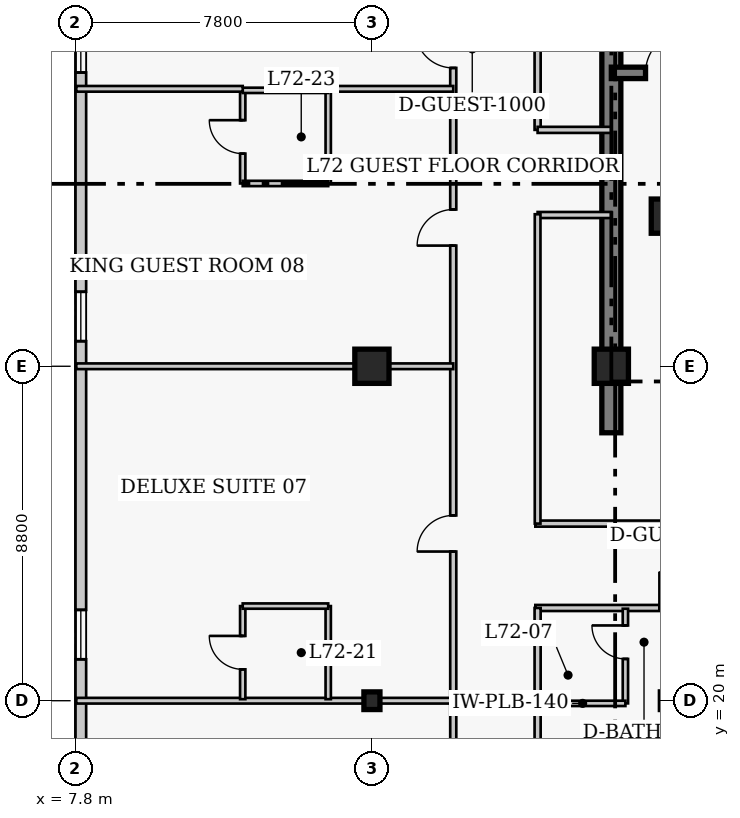
"""IFC4 building model, lengths in metres.
Left out: names, types, materials, properties, quantities, classifications, styles, units other than length and angle.
Written with IfcOpenShell. Run it as: python <this file> out.ifc"""

import sys

from ifc_helpers import new_model, si_unit, direction, frame, frame_2d, origin, origin_2d, place, context, subcontext, project, spatial, rectangle, i_section, extrude, element, fill, save


model = new_model("IFC4")
c1 = context("Model", 3, precision=1e-05, world=origin(), true_north=direction((0.0, 1.0)))
c2 = subcontext(c1, "Body", "Model", "MODEL_VIEW")
j1 = project(units=[si_unit("LENGTHUNIT", "METRE"), si_unit("PLANEANGLEUNIT", "RADIAN")], contexts=[c1])
p1 = place(None, origin())
s1 = spatial("IfcSite", under=j1, at=p1, CompositionType="ELEMENT")
p2 = place(p1, origin())
s2 = spatial("IfcBuilding", under=s1, at=p2, CompositionType="ELEMENT")
p3 = place(p2, frame((0.0, 0.0, 289.4)))
s3 = spatial("IfcBuildingStorey", under=s2, at=p3, CompositionType="ELEMENT", Elevation=289.4)
p4 = place(p3, frame((21.9, 27.05, 0.0), z_axis=(0.0, 0.0, 1.0), x_axis=(0.0, 1.0, 0.0)))
e1 = element("IfcWall", 1, at=p4, inside=s3, PredefinedType="SHEAR", context=c2, shape_type="SweptSolid", body=[
    extrude(rectangle(XDim=13.52, YDim=0.5, at=frame_2d((6.76, 0.0))), origin(), (0.0, 0.0, 1.0), 4.0),
])
p5 = place(p3, frame((21.9, 36.52, 0.0), z_axis=(0.0, 0.0, 1.0), x_axis=(1.0, 0.0, 0.0)))
e2 = element("IfcWall", 2, at=p5, inside=s3, PredefinedType="SHEAR", context=c2, shape_type="SweptSolid", body=[
    extrude(rectangle(XDim=8.32, YDim=0.3, at=frame_2d((4.16, 0.0))), origin(), (0.0, 0.0, 1.0), 4.0),
])
p6 = place(p5, frame((0.9, 0.0, 0.0)))
e3 = element("IfcOpeningElement", 3, at=p6, cuts=e2, PredefinedType="OPENING", context=c2, shape_type="SweptSolid", body=[
    extrude(rectangle(XDim=1.1, YDim=2.15, at=frame_2d((0.55, 1.075))), frame((0.0, 0.16, 0.0), z_axis=(0.0, -1.0, 0.0), x_axis=(1.0, 0.0, 0.0)), (0.0, 0.0, 1.0), 0.32),
])
p7 = place(p3, frame((15.6, 20.0, 0.0), z_axis=(0.0, 0.0, 1.0), x_axis=(1.0, 0.0, 0.0)))
e4 = element("IfcColumn", 4, at=p7, inside=s3, PredefinedType="COLUMN", context=c2, shape_type="SweptSolid", body=[
    extrude(i_section(OverallWidth=0.422, OverallDepth=0.465, WebThickness=0.045, FlangeThickness=0.073, FilletRadius=0.017, at=origin_2d()), origin(), (0.0, 0.0, 1.0), 4.0),
])
p8 = place(p3, frame((15.6, 28.8, 0.0), z_axis=(0.0, 0.0, 1.0), x_axis=(1.0, 0.0, 0.0)))
e5 = element("IfcColumn", 5, at=p8, inside=s3, PredefinedType="COLUMN", context=c2, shape_type="SweptSolid", body=[
    extrude(rectangle(XDim=0.9, YDim=0.9, at=origin_2d()), origin(), (0.0, 0.0, 1.0), 4.0),
])
p9 = place(p3, frame((23.4, 20.0, 0.0), z_axis=(0.0, 0.0, 1.0), x_axis=(1.0, 0.0, 0.0)))
e6 = element("IfcColumn", 6, at=p9, inside=s3, PredefinedType="COLUMN", context=c2, shape_type="SweptSolid", body=[
    extrude(i_section(OverallWidth=0.422, OverallDepth=0.465, WebThickness=0.045, FlangeThickness=0.073, FilletRadius=0.017, at=origin_2d()), origin(), (0.0, 0.0, 1.0), 4.0),
])
for number, where, z_axis, x_axis in (
    (7, (21.9, 28.8, 0.0), (0.0, 0.0, 1.0), (1.0, 0.0, 0.0)),
    (8, (23.4, 32.75, 0.0), (0.0, 0.0, 1.0), (1.0, 0.0, 0.0)),
):
    element("IfcColumn", number, at=place(p3, frame(where, z_axis=z_axis, x_axis=x_axis)), inside=s3, PredefinedType="COLUMN", context=c2, shape_type="SweptSolid", body=[
        extrude(rectangle(XDim=0.9, YDim=0.9, at=origin_2d()), origin(), (0.0, 0.0, 1.0), 4.0),
    ])
p10 = place(p3, frame((7.94, 41.04, 0.0), z_axis=(0.0, 0.0, 1.0), x_axis=(0.0, -1.0, 0.0)))
e9 = element("IfcWall", 9, at=p10, inside=s3, PredefinedType="SOLIDWALL", context=c2, shape_type="SweptSolid", body=[
    extrude(rectangle(XDim=30.88, YDim=0.28, at=frame_2d((15.44, 0.0))), origin(), (0.0, 0.0, 1.0), 3.76),
])
p11 = place(p10, frame((3.21, 0.0, 0.85)))
e10 = element("IfcOpeningElement", 10, at=p11, cuts=e9, PredefinedType="OPENING", context=c2, shape_type="SweptSolid", body=[
    extrude(rectangle(XDim=1.3, YDim=1.7, at=frame_2d((0.65, 0.85))), frame((0.0, 0.15, 0.0), z_axis=(0.0, -1.0, 0.0), x_axis=(1.0, 0.0, 0.0)), (0.0, 0.0, 1.0), 0.3),
])
p12 = place(p10, frame((10.28, 0.0, 0.85)))
e11 = element("IfcOpeningElement", 11, at=p12, cuts=e9, PredefinedType="OPENING", context=c2, shape_type="SweptSolid", body=[
    extrude(rectangle(XDim=1.3, YDim=1.7, at=frame_2d((0.65, 0.85))), frame((0.0, 0.15, 0.0), z_axis=(0.0, -1.0, 0.0), x_axis=(1.0, 0.0, 0.0)), (0.0, 0.0, 1.0), 0.3),
])
p13 = place(p10, frame((18.65, 0.0, 0.85)))
e12 = element("IfcOpeningElement", 12, at=p13, cuts=e9, PredefinedType="OPENING", context=c2, shape_type="SweptSolid", body=[
    extrude(rectangle(XDim=1.3, YDim=1.7, at=frame_2d((0.65, 0.85))), frame((0.0, 0.15, 0.0), z_axis=(0.0, -1.0, 0.0), x_axis=(1.0, 0.0, 0.0)), (0.0, 0.0, 1.0), 0.3),
])
p14 = place(p10, frame((26.37, 0.0, 0.85)))
e13 = element("IfcOpeningElement", 13, at=p14, cuts=e9, PredefinedType="OPENING", context=c2, shape_type="SweptSolid", body=[
    extrude(rectangle(XDim=1.3, YDim=1.7, at=frame_2d((0.65, 0.85))), frame((0.0, 0.15, 0.0), z_axis=(0.0, -1.0, 0.0), x_axis=(1.0, 0.0, 0.0)), (0.0, 0.0, 1.0), 0.3),
])
p15 = place(p3, frame((19.9, 24.66, 0.0), z_axis=(0.0, 0.0, 1.0), x_axis=(1.0, 0.0, 0.0)))
e14 = element("IfcWall", 14, at=p15, inside=s3, PredefinedType="PARTITIONING", context=c2, shape_type="SweptSolid", body=[
    extrude(rectangle(XDim=13.75, YDim=0.16, at=frame_2d((6.875, 0.0))), origin(), (0.0, 0.0, 1.0), 3.76),
])
p16 = place(p15, frame((6.25, 0.0, 0.0)))
e15 = element("IfcOpeningElement", 15, at=p16, cuts=e14, PredefinedType="OPENING", context=c2, shape_type="SweptSolid", body=[
    extrude(rectangle(XDim=1.0, YDim=2.15, at=frame_2d((0.5, 1.075))), frame((0.0, 0.09, 0.0), z_axis=(0.0, -1.0, 0.0), x_axis=(1.0, 0.0, 0.0)), (0.0, 0.0, 1.0), 0.18),
])
p17 = place(p3, frame((19.9, 22.44, 0.0), z_axis=(0.0, 0.0, 1.0), x_axis=(1.0, 0.0, 0.0)))
e16 = element("IfcWall", 16, at=p17, inside=s3, PredefinedType="PARTITIONING", context=c2, shape_type="SweptSolid", body=[
    extrude(rectangle(XDim=15.9, YDim=0.16, at=frame_2d((7.95, 0.0))), origin(), (0.0, 0.0, 1.0), 3.76),
])
p18 = place(p17, frame((3.265, 0.0, 0.0)))
e17 = element("IfcOpeningElement", 17, at=p18, cuts=e16, PredefinedType="OPENING", context=c2, shape_type="SweptSolid", body=[
    extrude(rectangle(XDim=0.95, YDim=2.1, at=frame_2d((0.475, 1.05))), frame((0.0, 0.09, 0.0), z_axis=(0.0, -1.0, 0.0), x_axis=(1.0, 0.0, 0.0)), (0.0, 0.0, 1.0), 0.18),
])
p19 = place(p17, frame((7.135, 0.0, 0.0)))
e18 = element("IfcOpeningElement", 18, at=p19, cuts=e16, PredefinedType="OPENING", context=c2, shape_type="SweptSolid", body=[
    extrude(rectangle(XDim=1.0, YDim=2.15, at=frame_2d((0.5, 1.075))), frame((0.0, 0.09, 0.0), z_axis=(0.0, -1.0, 0.0), x_axis=(1.0, 0.0, 0.0)), (0.0, 0.0, 1.0), 0.18),
])
p20 = place(p17, frame((11.4, 0.0, 0.0)))
e19 = element("IfcOpeningElement", 19, at=p20, cuts=e16, PredefinedType="OPENING", context=c2, shape_type="SweptSolid", body=[
    extrude(rectangle(XDim=0.95, YDim=2.1, at=frame_2d((0.475, 1.05))), frame((0.0, 0.09, 0.0), z_axis=(0.0, -1.0, 0.0), x_axis=(1.0, 0.0, 0.0)), (0.0, 0.0, 1.0), 0.18),
])
p21 = place(p3, frame((17.74, 8.55, 0.0), z_axis=(0.0, 0.0, 1.0), x_axis=(0.0, 1.0, 0.0)))
e20 = element("IfcWall", 20, at=p21, inside=s3, PredefinedType="PARTITIONING", context=c2, shape_type="SweptSolid", body=[
    extrude(rectangle(XDim=32.1, YDim=0.16, at=frame_2d((16.05, 0.0))), origin(), (0.0, 0.0, 1.0), 3.76),
])
p22 = place(p21, frame((5.25, 0.0, 0.0)))
e21 = element("IfcOpeningElement", 21, at=p22, cuts=e20, PredefinedType="OPENING", context=c2, shape_type="SweptSolid", body=[
    extrude(rectangle(XDim=0.95, YDim=2.1, at=frame_2d((0.475, 1.05))), frame((0.0, 0.09, 0.0), z_axis=(0.0, -1.0, 0.0), x_axis=(1.0, 0.0, 0.0)), (0.0, 0.0, 1.0), 0.18),
])
p23 = place(p21, frame((15.375, 0.0, 0.0)))
e22 = element("IfcOpeningElement", 22, at=p23, cuts=e20, PredefinedType="OPENING", context=c2, shape_type="SweptSolid", body=[
    extrude(rectangle(XDim=0.95, YDim=2.1, at=frame_2d((0.475, 1.05))), frame((0.0, 0.09, 0.0), z_axis=(0.0, -1.0, 0.0), x_axis=(1.0, 0.0, 0.0)), (0.0, 0.0, 1.0), 0.18),
])
p24 = place(p21, frame((23.425, 0.0, 0.0)))
e23 = element("IfcOpeningElement", 23, at=p24, cuts=e20, PredefinedType="OPENING", context=c2, shape_type="SweptSolid", body=[
    extrude(rectangle(XDim=0.95, YDim=2.1, at=frame_2d((0.475, 1.05))), frame((0.0, 0.09, 0.0), z_axis=(0.0, -1.0, 0.0), x_axis=(1.0, 0.0, 0.0)), (0.0, 0.0, 1.0), 0.18),
])
p25 = place(p21, frame((28.1, 0.0, 0.0)))
e24 = element("IfcOpeningElement", 24, at=p25, cuts=e20, PredefinedType="OPENING", context=c2, shape_type="SweptSolid", body=[
    extrude(rectangle(XDim=1.0, YDim=2.15, at=frame_2d((0.5, 1.075))), frame((0.0, 0.09, 0.0), z_axis=(0.0, -1.0, 0.0), x_axis=(1.0, 0.0, 0.0)), (0.0, 0.0, 1.0), 0.18),
])
p26 = place(p3, frame((19.96, 8.55, 0.0), z_axis=(0.0, 0.0, 1.0), x_axis=(0.0, 1.0, 0.0)))
e25 = element("IfcWall", 25, at=p26, inside=s3, PredefinedType="PARTITIONING", context=c2, shape_type="SweptSolid", body=[
    extrude(rectangle(XDim=13.89, YDim=0.16, at=frame_2d((6.945, 0.0))), origin(), (0.0, 0.0, 1.0), 3.76),
])
p27 = place(p3, frame((19.96, 35.02, 0.0), z_axis=(0.0, 0.0, 1.0), x_axis=(0.0, 1.0, 0.0)))
e26 = element("IfcWall", 26, at=p27, inside=s3, PredefinedType="PARTITIONING", context=c2, shape_type="SweptSolid", body=[
    extrude(rectangle(XDim=5.63, YDim=0.16, at=frame_2d((2.815, 0.0))), origin(), (0.0, 0.0, 1.0), 3.76),
])
for number, where, z_axis, x_axis in (
    (27, (19.96, 35.02, 0.0), (0.0, 0.0, 1.0), (1.0, 0.0, 0.0)),
    (28, (19.96, 32.78, 0.0), (0.0, 0.0, 1.0), (1.0, 0.0, 0.0)),
):
    element("IfcWall", number, at=place(p3, frame(where, z_axis=z_axis, x_axis=x_axis)), inside=s3, PredefinedType="PARTITIONING", context=c2, shape_type="SweptSolid", body=[
        extrude(rectangle(XDim=1.94, YDim=0.16, at=frame_2d((0.97, 0.0))), origin(), (0.0, 0.0, 1.0), 3.76),
    ])
p28 = place(p3, frame((19.96, 24.66, 0.0), z_axis=(0.0, 0.0, 1.0), x_axis=(0.0, 1.0, 0.0)))
e29 = element("IfcWall", 29, at=p28, inside=s3, PredefinedType="PARTITIONING", context=c2, shape_type="SweptSolid", body=[
    extrude(rectangle(XDim=8.14, YDim=0.15, at=frame_2d((4.07, 0.0))), origin(), (0.0, 0.0, 1.0), 3.76),
])
p29 = place(p3, frame((22.27, 19.93, 0.0), z_axis=(0.0, 0.0, 1.0), x_axis=(0.0, 1.0, 0.0)))
e30 = element("IfcWall", 30, at=p29, inside=s3, PredefinedType="PLUMBINGWALL", context=c2, shape_type="SweptSolid", body=[
    extrude(rectangle(XDim=2.49, YDim=0.14, at=frame_2d((1.245, 0.0))), origin(), (0.0, 0.0, 1.0), 3.76),
])
p30 = place(p29, frame((1.17, 0.0, 0.0)))
e31 = element("IfcOpeningElement", 31, at=p30, cuts=e30, PredefinedType="OPENING", context=c2, shape_type="SweptSolid", body=[
    extrude(rectangle(XDim=0.88, YDim=2.05, at=frame_2d((0.44, 1.025))), frame((0.0, 0.08, 0.0), z_axis=(0.0, -1.0, 0.0), x_axis=(1.0, 0.0, 0.0)), (0.0, 0.0, 1.0), 0.16),
])
p31 = place(p3, frame((20.02, 19.93, 0.0), z_axis=(0.0, 0.0, 1.0), x_axis=(1.0, 0.0, 0.0)))
e32 = element("IfcWall", 32, at=p31, inside=s3, PredefinedType="PLUMBINGWALL", context=c2, shape_type="SweptSolid", body=[
    extrude(rectangle(XDim=2.25, YDim=0.14, at=frame_2d((1.125, 0.0))), origin(), (0.0, 0.0, 1.0), 3.064),
])
p32 = place(p3, frame((7.82, 20.0, 0.0), z_axis=(0.0, 0.0, 1.0), x_axis=(1.0, 0.0, 0.0)))
e33 = element("IfcWall", 33, at=p32, inside=s3, PredefinedType="PARTITIONING", context=c2, shape_type="SweptSolid", body=[
    extrude(rectangle(XDim=9.92, YDim=0.15, at=frame_2d((4.96, 0.0))), origin(), (0.0, 0.0, 1.0), 3.064),
])
p33 = place(p3, frame((12.2, 20.04, 0.0), z_axis=(0.0, 0.0, 1.0), x_axis=(0.0, 1.0, 0.0)))
e34 = element("IfcWall", 34, at=p33, inside=s3, PredefinedType="PLUMBINGWALL", context=c2, shape_type="SweptSolid", body=[
    extrude(rectangle(XDim=2.45, YDim=0.14, at=frame_2d((1.225, 0.0))), origin(), (0.0, 0.0, 1.0), 3.76),
])
p34 = place(p33, frame((0.785, 0.0, 0.0)))
e35 = element("IfcOpeningElement", 35, at=p34, cuts=e34, PredefinedType="OPENING", context=c2, shape_type="SweptSolid", body=[
    extrude(rectangle(XDim=0.88, YDim=2.05, at=frame_2d((0.44, 1.025))), frame((0.0, 0.08, 0.0), z_axis=(0.0, -1.0, 0.0), x_axis=(1.0, 0.0, 0.0)), (0.0, 0.0, 1.0), 0.16),
])
p35 = place(p3, frame((14.45, 20.04, 0.0), z_axis=(0.0, 0.0, 1.0), x_axis=(0.0, 1.0, 0.0)))
e36 = element("IfcWall", 36, at=p35, inside=s3, PredefinedType="PLUMBINGWALL", context=c2, shape_type="SweptSolid", body=[
    extrude(rectangle(XDim=2.45, YDim=0.14, at=frame_2d((1.225, 0.0))), origin(), (0.0, 0.0, 1.0), 3.76),
])
p36 = place(p3, frame((12.2, 22.49, 0.0), z_axis=(0.0, 0.0, 1.0), x_axis=(1.0, 0.0, 0.0)))
e37 = element("IfcWall", 37, at=p36, inside=s3, PredefinedType="PLUMBINGWALL", context=c2, shape_type="SweptSolid", body=[
    extrude(rectangle(XDim=2.25, YDim=0.14, at=frame_2d((1.125, 0.0))), origin(), (0.0, 0.0, 1.0), 3.76),
])
p37 = place(p3, frame((7.82, 28.8, 0.0), z_axis=(0.0, 0.0, 1.0), x_axis=(1.0, 0.0, 0.0)))
e38 = element("IfcWall", 38, at=p37, inside=s3, PredefinedType="PARTITIONING", context=c2, shape_type="SweptSolid", body=[
    extrude(rectangle(XDim=9.92, YDim=0.15, at=frame_2d((4.96, 0.0))), origin(), (0.0, 0.0, 1.0), 3.064),
])
p38 = place(p3, frame((12.2, 33.61, 0.0), z_axis=(0.0, 0.0, 1.0), x_axis=(0.0, 1.0, 0.0)))
e39 = element("IfcWall", 39, at=p38, inside=s3, PredefinedType="PLUMBINGWALL", context=c2, shape_type="SweptSolid", body=[
    extrude(rectangle(XDim=2.45, YDim=0.14, at=frame_2d((1.225, 0.0))), origin(), (0.0, 0.0, 1.0), 3.76),
])
p39 = place(p38, frame((0.785, 0.0, 0.0)))
e40 = element("IfcOpeningElement", 40, at=p39, cuts=e39, PredefinedType="OPENING", context=c2, shape_type="SweptSolid", body=[
    extrude(rectangle(XDim=0.88, YDim=2.05, at=frame_2d((0.44, 1.025))), frame((0.0, 0.08, 0.0), z_axis=(0.0, -1.0, 0.0), x_axis=(1.0, 0.0, 0.0)), (0.0, 0.0, 1.0), 0.16),
])
p40 = place(p3, frame((14.45, 33.61, 0.0), z_axis=(0.0, 0.0, 1.0), x_axis=(0.0, 1.0, 0.0)))
e41 = element("IfcWall", 41, at=p40, inside=s3, PredefinedType="PLUMBINGWALL", context=c2, shape_type="SweptSolid", body=[
    extrude(rectangle(XDim=2.45, YDim=0.14, at=frame_2d((1.225, 0.0))), origin(), (0.0, 0.0, 1.0), 3.76),
])
for number, where, z_axis, x_axis in (
    (42, (12.2, 33.61, 0.0), (0.0, 0.0, 1.0), (1.0, 0.0, 0.0)),
    (43, (12.2, 36.06, 0.0), (0.0, 0.0, 1.0), (1.0, 0.0, 0.0)),
):
    element("IfcWall", number, at=place(p3, frame(where, z_axis=z_axis, x_axis=x_axis)), inside=s3, PredefinedType="PLUMBINGWALL", context=c2, shape_type="SweptSolid", body=[
        extrude(rectangle(XDim=2.25, YDim=0.14, at=frame_2d((1.125, 0.0))), origin(), (0.0, 0.0, 1.0), 3.76),
    ])
p41 = place(p3, frame((7.82, 36.1, 0.0), z_axis=(0.0, 0.0, 1.0), x_axis=(1.0, 0.0, 0.0)))
e44 = element("IfcWall", 44, at=p41, inside=s3, PredefinedType="PARTITIONING", context=c2, shape_type="SweptSolid", body=[
    extrude(rectangle(XDim=4.38, YDim=0.15, at=frame_2d((2.19, 0.0))), origin(), (0.0, 0.0, 1.0), 3.76),
])
p42 = place(p3, frame((14.45, 36.1, 0.0), z_axis=(0.0, 0.0, 1.0), x_axis=(1.0, 0.0, 0.0)))
e45 = element("IfcWall", 45, at=p42, inside=s3, PredefinedType="PARTITIONING", context=c2, shape_type="SweptSolid", body=[
    extrude(rectangle(XDim=3.29, YDim=0.15, at=frame_2d((1.645, 0.0))), origin(), (0.0, 0.0, 1.0), 3.76),
])
p43 = place(p11, origin())
e46 = element("IfcWindow", 46, at=p43, inside=s3, PartitioningType="SINGLE_PANEL", PredefinedType="WINDOW", context=c2, shape_type="SweptSolid", body=[
    extrude(rectangle(XDim=1.3, YDim=1.7, at=frame_2d((0.65, 0.85))), frame((0.0, 0.03, 0.0), z_axis=(0.0, -1.0, 0.0), x_axis=(1.0, 0.0, 0.0)), (0.0, 0.0, 1.0), 0.06),
])
fill(e10, e46)
p44 = place(p12, origin())
e47 = element("IfcWindow", 47, at=p44, inside=s3, PartitioningType="SINGLE_PANEL", PredefinedType="WINDOW", context=c2, shape_type="SweptSolid", body=[
    extrude(rectangle(XDim=1.3, YDim=1.7, at=frame_2d((0.65, 0.85))), frame((0.0, 0.03, 0.0), z_axis=(0.0, -1.0, 0.0), x_axis=(1.0, 0.0, 0.0)), (0.0, 0.0, 1.0), 0.06),
])
fill(e11, e47)
p45 = place(p13, origin())
e48 = element("IfcWindow", 48, at=p45, inside=s3, PartitioningType="SINGLE_PANEL", PredefinedType="WINDOW", context=c2, shape_type="SweptSolid", body=[
    extrude(rectangle(XDim=1.3, YDim=1.7, at=frame_2d((0.65, 0.85))), frame((0.0, 0.03, 0.0), z_axis=(0.0, -1.0, 0.0), x_axis=(1.0, 0.0, 0.0)), (0.0, 0.0, 1.0), 0.06),
])
fill(e12, e48)
p46 = place(p30, origin())
e49 = element("IfcDoor", 49, at=p46, inside=s3, OperationType="SINGLE_SWING_RIGHT", PredefinedType="DOOR", context=c2, shape_type="SweptSolid", body=[
    extrude(rectangle(XDim=0.88, YDim=2.05, at=frame_2d((0.44, 1.025))), frame((0.0, 0.025, 0.0), z_axis=(0.0, -1.0, 0.0), x_axis=(1.0, 0.0, 0.0)), (0.0, 0.0, 1.0), 0.05),
])
fill(e31, e49)
p47 = place(p18, origin())
e50 = element("IfcDoor", 50, at=p47, inside=s3, OperationType="SINGLE_SWING_LEFT", PredefinedType="DOOR", context=c2, shape_type="SweptSolid", body=[
    extrude(rectangle(XDim=0.95, YDim=2.1, at=frame_2d((0.475, 1.05))), frame((0.0, 0.025, 0.0), z_axis=(0.0, -1.0, 0.0), x_axis=(1.0, 0.0, 0.0)), (0.0, 0.0, 1.0), 0.05),
])
fill(e17, e50)
p48 = place(p34, origin())
e51 = element("IfcDoor", 51, at=p48, inside=s3, OperationType="SINGLE_SWING_RIGHT", PredefinedType="DOOR", context=c2, shape_type="SweptSolid", body=[
    extrude(rectangle(XDim=0.88, YDim=2.05, at=frame_2d((0.44, 1.025))), frame((0.0, 0.025, 0.0), z_axis=(0.0, -1.0, 0.0), x_axis=(1.0, 0.0, 0.0)), (0.0, 0.0, 1.0), 0.05),
])
fill(e35, e51)
p49 = place(p23, origin())
e52 = element("IfcDoor", 52, at=p49, inside=s3, OperationType="SINGLE_SWING_LEFT", PredefinedType="DOOR", context=c2, shape_type="SweptSolid", body=[
    extrude(rectangle(XDim=0.95, YDim=2.1, at=frame_2d((0.475, 1.05))), frame((0.0, 0.025, 0.0), z_axis=(0.0, -1.0, 0.0), x_axis=(1.0, 0.0, 0.0)), (0.0, 0.0, 1.0), 0.05),
])
fill(e22, e52)
p50 = place(p39, origin())
e53 = element("IfcDoor", 53, at=p50, inside=s3, OperationType="SINGLE_SWING_RIGHT", PredefinedType="DOOR", context=c2, shape_type="SweptSolid", body=[
    extrude(rectangle(XDim=0.88, YDim=2.05, at=frame_2d((0.44, 1.025))), frame((0.0, 0.025, 0.0), z_axis=(0.0, -1.0, 0.0), x_axis=(1.0, 0.0, 0.0)), (0.0, 0.0, 1.0), 0.05),
])
fill(e40, e53)
p51 = place(p24, origin())
e54 = element("IfcDoor", 54, at=p51, inside=s3, OperationType="SINGLE_SWING_LEFT", PredefinedType="DOOR", context=c2, shape_type="SweptSolid", body=[
    extrude(rectangle(XDim=0.95, YDim=2.1, at=frame_2d((0.475, 1.05))), frame((0.0, 0.025, 0.0), z_axis=(0.0, -1.0, 0.0), x_axis=(1.0, 0.0, 0.0)), (0.0, 0.0, 1.0), 0.05),
])
fill(e23, e54)
p52 = place(p25, origin())
e55 = element("IfcDoor", 55, at=p52, inside=s3, OperationType="SINGLE_SWING_RIGHT", PredefinedType="DOOR", context=c2, shape_type="SweptSolid", body=[
    extrude(rectangle(XDim=1.0, YDim=2.15, at=frame_2d((0.5, 1.075))), frame((0.0, 0.025, 0.0), z_axis=(0.0, -1.0, 0.0), x_axis=(1.0, 0.0, 0.0)), (0.0, 0.0, 1.0), 0.05),
])
fill(e24, e55)
p53 = place(p6, origin())
e56 = element("IfcDoor", 56, at=p53, inside=s3, OperationType="SINGLE_SWING_RIGHT", PredefinedType="DOOR", context=c2, shape_type="SweptSolid", body=[
    extrude(rectangle(XDim=1.1, YDim=2.15, at=frame_2d((0.55, 1.075))), frame((0.0, 0.025, 0.0), z_axis=(0.0, -1.0, 0.0), x_axis=(1.0, 0.0, 0.0)), (0.0, 0.0, 1.0), 0.05),
])
fill(e3, e56)
save(model, sys.argv[1])
